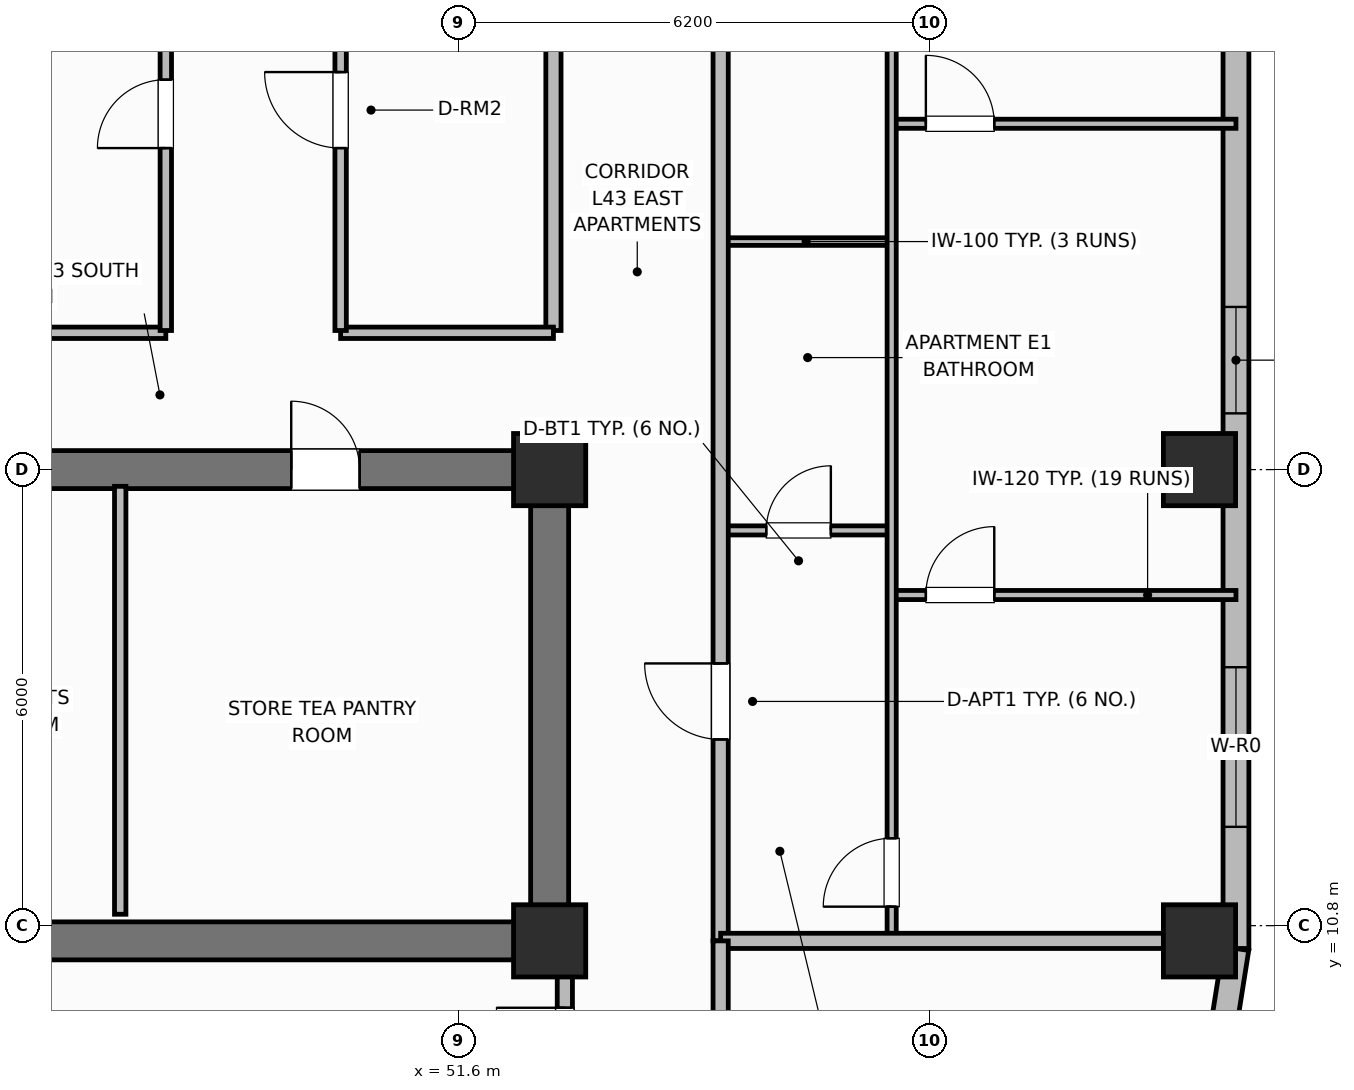
"""IFC4 building model, lengths in metres.
Left out: names, types, materials, properties, quantities, classifications, styles, units other than length and angle.
Written with IfcOpenShell. Run it as: python <this file> out.ifc"""

import sys

from ifc_helpers import new_model, si_unit, direction, frame, frame_2d, origin, origin_2d, place, context, subcontext, project, spatial, rectangle, extrude, element, fill, save


model = new_model("IFC4")
c1 = context("Model", 3, precision=1e-05, world=origin(), true_north=direction((0.0, 1.0)))
c2 = subcontext(c1, "Body", "Model", "MODEL_VIEW")
j1 = project(units=[si_unit("LENGTHUNIT", "METRE"), si_unit("PLANEANGLEUNIT", "RADIAN")], contexts=[c1])
p1 = place(None, origin())
s1 = spatial("IfcSite", under=j1, at=p1, CompositionType="ELEMENT")
p2 = place(p1, origin())
s2 = spatial("IfcBuilding", under=s1, at=p2, CompositionType="ELEMENT")
p3 = place(p2, frame((0.0, 0.0, 173.7)))
s3 = spatial("IfcBuildingStorey", under=s2, at=p3, CompositionType="ELEMENT", Elevation=173.7)
p4 = place(p3, frame((52.8, 10.6, 0.0), z_axis=(0.0, 0.0, 1.0), x_axis=(-1.0, 0.0, 0.0)))
e1 = element("IfcWall", 1, at=p4, inside=s3, PredefinedType="SHEAR", context=c2, shape_type="SweptSolid", body=[
    extrude(rectangle(XDim=27.2, YDim=0.5, at=frame_2d((13.6, 0.0))), origin(), (0.0, 0.0, 1.0), 3.7),
])
p5 = place(p3, frame((52.8, 10.85, 0.0), z_axis=(0.0, 0.0, 1.0), x_axis=(0.0, 1.0, 0.0)))
e2 = element("IfcWall", 2, at=p5, inside=s3, PredefinedType="SHEAR", context=c2, shape_type="SweptSolid", body=[
    extrude(rectangle(XDim=5.7, YDim=0.5, at=frame_2d((2.85, 0.0))), origin(), (0.0, 0.0, 1.0), 3.7),
])
p6 = place(p3, frame((25.6, 16.8, 0.0), z_axis=(0.0, 0.0, 1.0), x_axis=(1.0, 0.0, 0.0)))
e3 = element("IfcWall", 3, at=p6, inside=s3, PredefinedType="SHEAR", context=c2, shape_type="SweptSolid", body=[
    extrude(rectangle(XDim=27.2, YDim=0.5, at=frame_2d((13.6, 0.0))), origin(), (0.0, 0.0, 1.0), 3.7),
])
p7 = place(p6, frame((1.8, 0.0, 0.0)))
e4 = element("IfcOpeningElement", 4, at=p7, cuts=e3, PredefinedType="OPENING", context=c2, shape_type="SweptSolid", body=[
    extrude(rectangle(XDim=1.1, YDim=2.15, at=frame_2d((0.55, 1.075))), frame((0.0, 0.26, 0.0), z_axis=(0.0, -1.0, 0.0), x_axis=(1.0, 0.0, 0.0)), (0.0, 0.0, 1.0), 0.52),
])
p8 = place(p6, frame((5.6, 0.0, 0.0)))
e5 = element("IfcOpeningElement", 5, at=p8, cuts=e3, PredefinedType="OPENING", context=c2, shape_type="SweptSolid", body=[
    extrude(rectangle(XDim=0.85, YDim=2.1, at=frame_2d((0.425, 1.05))), frame((0.0, 0.26, 0.0), z_axis=(0.0, -1.0, 0.0), x_axis=(1.0, 0.0, 0.0)), (0.0, 0.0, 1.0), 0.52),
])
p9 = place(p6, frame((13.0, 0.0, 0.0)))
e6 = element("IfcOpeningElement", 6, at=p9, cuts=e3, PredefinedType="OPENING", context=c2, shape_type="SweptSolid", body=[
    extrude(rectangle(XDim=1.2, YDim=2.15, at=frame_2d((0.6, 1.075))), frame((0.0, 0.26, 0.0), z_axis=(0.0, -1.0, 0.0), x_axis=(1.0, 0.0, 0.0)), (0.0, 0.0, 1.0), 0.52),
])
p10 = place(p6, frame((19.2, 0.0, 0.0)))
e7 = element("IfcOpeningElement", 7, at=p10, cuts=e3, PredefinedType="OPENING", context=c2, shape_type="SweptSolid", body=[
    extrude(rectangle(XDim=0.85, YDim=2.1, at=frame_2d((0.425, 1.05))), frame((0.0, 0.26, 0.0), z_axis=(0.0, -1.0, 0.0), x_axis=(1.0, 0.0, 0.0)), (0.0, 0.0, 1.0), 0.52),
])
p11 = place(p6, frame((23.8, 0.0, 0.0)))
e8 = element("IfcOpeningElement", 8, at=p11, cuts=e3, PredefinedType="OPENING", context=c2, shape_type="SweptSolid", body=[
    extrude(rectangle(XDim=0.9, YDim=2.1, at=frame_2d((0.45, 1.05))), frame((0.0, 0.26, 0.0), z_axis=(0.0, -1.0, 0.0), x_axis=(1.0, 0.0, 0.0)), (0.0, 0.0, 1.0), 0.52),
])
for number, where, z_axis, x_axis in (
    (9, (52.8, 10.6, 0.0), (0.0, 0.0, 1.0), (1.0, 0.0, 0.0)),
    (10, (52.8, 16.8, 0.0), (0.0, 0.0, 1.0), (1.0, 0.0, 0.0)),
    (11, (61.35, 10.6, 0.0), (0.0, 0.0, 1.0), (1.0, 0.0, 0.0)),
    (12, (61.35, 16.8, 0.0), (0.0, 0.0, 1.0), (1.0, 0.0, 0.0)),
):
    element("IfcColumn", number, at=place(p3, frame(where, z_axis=z_axis, x_axis=x_axis)), inside=s3, PredefinedType="COLUMN", context=c2, shape_type="SweptSolid", body=[
        extrude(rectangle(XDim=0.95, YDim=0.95, at=origin_2d()), origin(), (0.0, 0.0, 1.0), 3.7),
    ])
p12 = place(p3, frame((61.652, 9.378, 0.0), z_axis=(0.0, 0.0, 1.0), x_axis=(0.156514556949, 0.987675651954, 0.0)))
e13 = element("IfcWall", 13, at=p12, inside=s3, PredefinedType="SOLIDWALL", context=c2, shape_type="SweptSolid", body=[
    extrude(rectangle(XDim=1.135, YDim=0.34, at=frame_2d((0.568, 0.0))), origin(), (0.0, 0.0, 1.0), 2.72),
])
p13 = place(p3, frame((61.83, 10.5, 0.0), z_axis=(0.0, 0.0, 1.0), x_axis=(0.0, 1.0, 0.0)))
e14 = element("IfcWall", 14, at=p13, inside=s3, PredefinedType="SOLIDWALL", context=c2, shape_type="SweptSolid", body=[
    extrude(rectangle(XDim=13.3, YDim=0.34, at=frame_2d((6.65, 0.0))), origin(), (0.0, 0.0, 1.0), 2.72),
])
p14 = place(p13, frame((1.6, 0.0, 0.7)))
e15 = element("IfcOpeningElement", 15, at=p14, cuts=e14, PredefinedType="OPENING", context=c2, shape_type="SweptSolid", body=[
    extrude(rectangle(XDim=2.1, YDim=1.9, at=frame_2d((1.05, 0.95))), frame((0.0, 0.18, 0.0), z_axis=(0.0, -1.0, 0.0), x_axis=(1.0, 0.0, 0.0)), (0.0, 0.0, 1.0), 0.36),
])
p15 = place(p13, frame((7.04, 0.0, 0.71)))
e16 = element("IfcOpeningElement", 16, at=p15, cuts=e14, PredefinedType="OPENING", context=c2, shape_type="SweptSolid", body=[
    extrude(rectangle(XDim=1.4, YDim=1.85, at=frame_2d((0.7, 0.925))), frame((0.0, 0.18, 0.0), z_axis=(0.0, -1.0, 0.0), x_axis=(1.0, 0.0, 0.0)), (0.0, 0.0, 1.0), 0.36),
])
p16 = place(p3, frame((47.15, 10.95, 0.0), z_axis=(0.0, 0.0, 1.0), x_axis=(0.0, 1.0, 0.0)))
e17 = element("IfcWall", 17, at=p16, inside=s3, PredefinedType="PARTITIONING", context=c2, shape_type="SweptSolid", body=[
    extrude(rectangle(XDim=5.63, YDim=0.15, at=frame_2d((2.815, 0.0))), origin(), (0.0, 0.0, 1.0), 2.55),
])
p17 = place(p3, frame((52.85, 18.63, 0.0), z_axis=(0.0, 0.0, 1.0), x_axis=(0.0, 1.0, 0.0)))
e18 = element("IfcWall", 18, at=p17, inside=s3, PredefinedType="PARTITIONING", context=c2, shape_type="SweptSolid", body=[
    extrude(rectangle(XDim=19.14, YDim=0.2, at=frame_2d((9.57, 0.0))), origin(), (0.0, 0.0, 1.0), 2.55),
])
p18 = place(p3, frame((25.55, 18.6, 0.0), z_axis=(0.0, 0.0, 1.0), x_axis=(1.0, 0.0, 0.0)))
e19 = element("IfcWall", 19, at=p18, inside=s3, PredefinedType="PARTITIONING", context=c2, shape_type="SweptSolid", body=[
    extrude(rectangle(XDim=22.2, YDim=0.15, at=frame_2d((11.1, 0.0))), origin(), (0.0, 0.0, 1.0), 2.55),
])
p19 = place(p3, frame((50.05, 18.6, 0.0), z_axis=(0.0, 0.0, 1.0), x_axis=(1.0, 0.0, 0.0)))
e20 = element("IfcWall", 20, at=p19, inside=s3, PredefinedType="PARTITIONING", context=c2, shape_type="SweptSolid", body=[
    extrude(rectangle(XDim=2.8, YDim=0.15, at=frame_2d((1.4, 0.0))), origin(), (0.0, 0.0, 1.0), 2.55),
])
p20 = place(p3, frame((47.75, 18.63, 0.0), z_axis=(0.0, 0.0, 1.0), x_axis=(0.0, 1.0, 0.0)))
e21 = element("IfcWall", 21, at=p20, inside=s3, PredefinedType="PARTITIONING", context=c2, shape_type="SweptSolid", body=[
    extrude(rectangle(XDim=19.14, YDim=0.15, at=frame_2d((9.57, 0.0))), origin(), (0.0, 0.0, 1.0), 2.55),
])
p21 = place(p20, frame((2.4, 0.0, 0.0)))
e22 = element("IfcOpeningElement", 22, at=p21, cuts=e21, PredefinedType="OPENING", context=c2, shape_type="SweptSolid", body=[
    extrude(rectangle(XDim=0.9, YDim=2.1, at=frame_2d((0.45, 1.05))), frame((0.0, 0.085, 0.0), z_axis=(0.0, -1.0, 0.0), x_axis=(1.0, 0.0, 0.0)), (0.0, 0.0, 1.0), 0.17),
])
p22 = place(p20, frame((10.804, 0.0, 0.0)))
e23 = element("IfcOpeningElement", 23, at=p22, cuts=e21, PredefinedType="OPENING", context=c2, shape_type="SweptSolid", body=[
    extrude(rectangle(XDim=0.9, YDim=2.1, at=frame_2d((0.45, 1.05))), frame((0.0, 0.085, 0.0), z_axis=(0.0, -1.0, 0.0), x_axis=(1.0, 0.0, 0.0)), (0.0, 0.0, 1.0), 0.17),
])
p23 = place(p3, frame((50.05, 18.63, 0.0), z_axis=(0.0, 0.0, 1.0), x_axis=(0.0, 1.0, 0.0)))
e24 = element("IfcWall", 24, at=p23, inside=s3, PredefinedType="PARTITIONING", context=c2, shape_type="SweptSolid", body=[
    extrude(rectangle(XDim=19.14, YDim=0.15, at=frame_2d((9.57, 0.0))), origin(), (0.0, 0.0, 1.0), 2.55),
])
p24 = place(p23, frame((2.4, 0.0, 0.0)))
e25 = element("IfcOpeningElement", 25, at=p24, cuts=e24, PredefinedType="OPENING", context=c2, shape_type="SweptSolid", body=[
    extrude(rectangle(XDim=1.0, YDim=2.15, at=frame_2d((0.5, 1.075))), frame((0.0, 0.085, 0.0), z_axis=(0.0, -1.0, 0.0), x_axis=(1.0, 0.0, 0.0)), (0.0, 0.0, 1.0), 0.17),
])
p25 = place(p23, frame((10.804, 0.0, 0.0)))
e26 = element("IfcOpeningElement", 26, at=p25, cuts=e24, PredefinedType="OPENING", context=c2, shape_type="SweptSolid", body=[
    extrude(rectangle(XDim=1.0, YDim=2.15, at=frame_2d((0.5, 1.075))), frame((0.0, 0.085, 0.0), z_axis=(0.0, -1.0, 0.0), x_axis=(1.0, 0.0, 0.0)), (0.0, 0.0, 1.0), 0.17),
])
p26 = place(p3, frame((55.05, 16.0, 0.0), z_axis=(0.0, 0.0, 1.0), x_axis=(1.0, 0.0, 0.0)))
e27 = element("IfcWall", 27, at=p26, inside=s3, PredefinedType="PARTITIONING", context=c2, shape_type="SweptSolid", body=[
    extrude(rectangle(XDim=2.25, YDim=0.12, at=frame_2d((1.125, 0.0))), origin(), (0.0, 0.0, 1.0), 2.55),
])
p27 = place(p26, frame((0.6, 0.0, 0.0)))
e28 = element("IfcOpeningElement", 28, at=p27, cuts=e27, PredefinedType="OPENING", context=c2, shape_type="SweptSolid", body=[
    extrude(rectangle(XDim=0.85, YDim=2.1, at=frame_2d((0.425, 1.05))), frame((0.0, 0.07, 0.0), z_axis=(0.0, -1.0, 0.0), x_axis=(1.0, 0.0, 0.0)), (0.0, 0.0, 1.0), 0.14),
])
p28 = place(p3, frame((55.05, 19.8, 0.0), z_axis=(0.0, 0.0, 1.0), x_axis=(1.0, 0.0, 0.0)))
e29 = element("IfcWall", 29, at=p28, inside=s3, PredefinedType="PARTITIONING", context=c2, shape_type="SweptSolid", body=[
    extrude(rectangle(XDim=2.25, YDim=0.1, at=frame_2d((1.125, 0.0))), origin(), (0.0, 0.0, 1.0), 2.55),
])
p29 = place(p3, frame((57.3, 15.15, 0.0), z_axis=(0.0, 0.0, 1.0), x_axis=(1.0, 0.0, 0.0)))
e30 = element("IfcWall", 30, at=p29, inside=s3, PredefinedType="PARTITIONING", context=c2, shape_type="SweptSolid", body=[
    extrude(rectangle(XDim=4.53, YDim=0.12, at=frame_2d((2.265, 0.0))), origin(), (0.0, 0.0, 1.0), 2.55),
])
p30 = place(p29, frame((0.45, 0.0, 0.0)))
e31 = element("IfcOpeningElement", 31, at=p30, cuts=e30, PredefinedType="OPENING", context=c2, shape_type="SweptSolid", body=[
    extrude(rectangle(XDim=0.9, YDim=2.1, at=frame_2d((0.45, 1.05))), frame((0.0, 0.07, 0.0), z_axis=(0.0, -1.0, 0.0), x_axis=(1.0, 0.0, 0.0)), (0.0, 0.0, 1.0), 0.14),
])
p31 = place(p3, frame((57.3, 21.35, 0.0), z_axis=(0.0, 0.0, 1.0), x_axis=(1.0, 0.0, 0.0)))
e32 = element("IfcWall", 32, at=p31, inside=s3, PredefinedType="PARTITIONING", context=c2, shape_type="SweptSolid", body=[
    extrude(rectangle(XDim=4.53, YDim=0.12, at=frame_2d((2.265, 0.0))), origin(), (0.0, 0.0, 1.0), 2.55),
])
p32 = place(p31, frame((0.45, 0.0, 0.0)))
e33 = element("IfcOpeningElement", 33, at=p32, cuts=e32, PredefinedType="OPENING", context=c2, shape_type="SweptSolid", body=[
    extrude(rectangle(XDim=0.9, YDim=2.1, at=frame_2d((0.45, 1.05))), frame((0.0, 0.07, 0.0), z_axis=(0.0, -1.0, 0.0), x_axis=(1.0, 0.0, 0.0)), (0.0, 0.0, 1.0), 0.14),
])
p33 = place(p3, frame((57.3, 10.64, 0.0), z_axis=(0.0, 0.0, 1.0), x_axis=(0.0, 1.0, 0.0)))
e34 = element("IfcWall", 34, at=p33, inside=s3, PredefinedType="PARTITIONING", context=c2, shape_type="SweptSolid", body=[
    extrude(rectangle(XDim=15.92, YDim=0.12, at=frame_2d((7.96, 0.0))), origin(), (0.0, 0.0, 1.0), 2.55),
])
p34 = place(p33, frame((0.41, 0.0, 0.0)))
e35 = element("IfcOpeningElement", 35, at=p34, cuts=e34, PredefinedType="OPENING", context=c2, shape_type="SweptSolid", body=[
    extrude(rectangle(XDim=0.9, YDim=2.1, at=frame_2d((0.45, 1.05))), frame((0.0, 0.07, 0.0), z_axis=(0.0, -1.0, 0.0), x_axis=(1.0, 0.0, 0.0)), (0.0, 0.0, 1.0), 0.14),
])
p35 = place(p33, frame((12.135, 0.0, 0.0)))
e36 = element("IfcOpeningElement", 36, at=p35, cuts=e34, PredefinedType="OPENING", context=c2, shape_type="SweptSolid", body=[
    extrude(rectangle(XDim=0.82, YDim=2.08, at=frame_2d((0.41, 1.04))), frame((0.0, 0.07, 0.0), z_axis=(0.0, -1.0, 0.0), x_axis=(1.0, 0.0, 0.0)), (0.0, 0.0, 1.0), 0.14),
])
p36 = place(p3, frame((55.05, 10.6, 0.0), z_axis=(0.0, 0.0, 1.0), x_axis=(0.0, 1.0, 0.0)))
e37 = element("IfcWall", 37, at=p36, inside=s3, PredefinedType="PARTITIONING", context=c2, shape_type="SweptSolid", body=[
    extrude(rectangle(XDim=35.2, YDim=0.2, at=frame_2d((17.6, 0.0))), origin(), (0.0, 0.0, 1.0), 2.55),
])
p37 = place(p36, frame((2.65, 0.0, 0.0)))
e38 = element("IfcOpeningElement", 38, at=p37, cuts=e37, PredefinedType="OPENING", context=c2, shape_type="SweptSolid", body=[
    extrude(rectangle(XDim=1.0, YDim=2.15, at=frame_2d((0.5, 1.075))), frame((0.0, 0.11, 0.0), z_axis=(0.0, -1.0, 0.0), x_axis=(1.0, 0.0, 0.0)), (0.0, 0.0, 1.0), 0.22),
])
p38 = place(p36, frame((19.95, 0.0, 0.0)))
e39 = element("IfcOpeningElement", 39, at=p38, cuts=e37, PredefinedType="OPENING", context=c2, shape_type="SweptSolid", body=[
    extrude(rectangle(XDim=1.0, YDim=2.15, at=frame_2d((0.5, 1.075))), frame((0.0, 0.11, 0.0), z_axis=(0.0, -1.0, 0.0), x_axis=(1.0, 0.0, 0.0)), (0.0, 0.0, 1.0), 0.22),
])
p39 = place(p3, frame((55.05, 10.6, 0.0), z_axis=(0.0, 0.0, 1.0), x_axis=(1.0, 0.0, 0.0)))
e40 = element("IfcWall", 40, at=p39, inside=s3, PredefinedType="PARTITIONING", context=c2, shape_type="SweptSolid", body=[
    extrude(rectangle(XDim=6.36, YDim=0.2, at=frame_2d((3.18, 0.0))), origin(), (0.0, 0.0, 1.0), 2.55),
])
p40 = place(p3, frame((55.05, 6.87, 0.0), z_axis=(0.0, 0.0, 1.0), x_axis=(0.0, 1.0, 0.0)))
e41 = element("IfcWall", 41, at=p40, inside=s3, PredefinedType="PARTITIONING", context=c2, shape_type="SweptSolid", body=[
    extrude(rectangle(XDim=3.73, YDim=0.2, at=frame_2d((1.865, 0.0))), origin(), (0.0, 0.0, 1.0), 2.55),
])
p41 = place(p3, frame((53.0, 8.17, 0.0), z_axis=(0.0, 0.0, 1.0), x_axis=(0.0, 1.0, 0.0)))
e42 = element("IfcWall", 42, at=p41, inside=s3, PredefinedType="PARTITIONING", context=c2, shape_type="SweptSolid", body=[
    extrude(rectangle(XDim=2.13, YDim=0.2, at=frame_2d((1.065, 0.0))), origin(), (0.0, 0.0, 1.0), 2.55),
])
p42 = place(p41, frame((0.65, 0.0, 0.0)))
e43 = element("IfcOpeningElement", 43, at=p42, cuts=e42, PredefinedType="OPENING", context=c2, shape_type="SweptSolid", body=[
    extrude(rectangle(XDim=0.9, YDim=2.1, at=frame_2d((0.45, 1.05))), frame((0.0, 0.11, 0.0), z_axis=(0.0, -1.0, 0.0), x_axis=(1.0, 0.0, 0.0)), (0.0, 0.0, 1.0), 0.22),
])
p43 = place(p14, origin())
e44 = element("IfcWindow", 44, at=p43, inside=s3, PartitioningType="SINGLE_PANEL", PredefinedType="WINDOW", context=c2, shape_type="SweptSolid", body=[
    extrude(rectangle(XDim=2.1, YDim=1.9, at=frame_2d((1.05, 0.95))), frame((0.0, 0.03, 0.0), z_axis=(0.0, -1.0, 0.0), x_axis=(1.0, 0.0, 0.0)), (0.0, 0.0, 1.0), 0.06),
])
fill(e15, e44)
p44 = place(p15, origin())
e45 = element("IfcWindow", 45, at=p44, inside=s3, PartitioningType="SINGLE_PANEL", PredefinedType="WINDOW", context=c2, shape_type="SweptSolid", body=[
    extrude(rectangle(XDim=1.4, YDim=1.85, at=frame_2d((0.7, 0.925))), frame((0.0, 0.03, 0.0), z_axis=(0.0, -1.0, 0.0), x_axis=(1.0, 0.0, 0.0)), (0.0, 0.0, 1.0), 0.06),
])
fill(e16, e45)
p45 = place(p21, origin())
e46 = element("IfcDoor", 46, at=p45, inside=s3, OperationType="SINGLE_SWING_LEFT", PredefinedType="DOOR", context=c2, shape_type="SweptSolid", body=[
    extrude(rectangle(XDim=0.9, YDim=2.1, at=frame_2d((0.45, 1.05))), frame((0.0, 0.025, 0.0), z_axis=(0.0, -1.0, 0.0), x_axis=(1.0, 0.0, 0.0)), (0.0, 0.0, 1.0), 0.05),
])
fill(e22, e46)
p46 = place(p24, origin())
e47 = element("IfcDoor", 47, at=p46, inside=s3, OperationType="SINGLE_SWING_RIGHT", PredefinedType="DOOR", context=c2, shape_type="SweptSolid", body=[
    extrude(rectangle(XDim=1.0, YDim=2.15, at=frame_2d((0.5, 1.075))), frame((0.0, 0.025, 0.0), z_axis=(0.0, -1.0, 0.0), x_axis=(1.0, 0.0, 0.0)), (0.0, 0.0, 1.0), 0.05),
])
fill(e25, e47)
p47 = place(p27, origin())
e48 = element("IfcDoor", 48, at=p47, inside=s3, OperationType="SINGLE_SWING_RIGHT", PredefinedType="DOOR", context=c2, shape_type="SweptSolid", body=[
    extrude(rectangle(XDim=0.85, YDim=2.1, at=frame_2d((0.425, 1.05))), frame((0.0, 0.025, 0.0), z_axis=(0.0, -1.0, 0.0), x_axis=(1.0, 0.0, 0.0)), (0.0, 0.0, 1.0), 0.05),
])
fill(e28, e48)
p48 = place(p30, origin())
e49 = element("IfcDoor", 49, at=p48, inside=s3, OperationType="SINGLE_SWING_RIGHT", PredefinedType="DOOR", context=c2, shape_type="SweptSolid", body=[
    extrude(rectangle(XDim=0.9, YDim=2.1, at=frame_2d((0.45, 1.05))), frame((0.0, 0.025, 0.0), z_axis=(0.0, -1.0, 0.0), x_axis=(1.0, 0.0, 0.0)), (0.0, 0.0, 1.0), 0.05),
])
fill(e31, e49)
p49 = place(p32, origin())
e50 = element("IfcDoor", 50, at=p49, inside=s3, OperationType="SINGLE_SWING_LEFT", PredefinedType="DOOR", context=c2, shape_type="SweptSolid", body=[
    extrude(rectangle(XDim=0.9, YDim=2.1, at=frame_2d((0.45, 1.05))), frame((0.0, 0.025, 0.0), z_axis=(0.0, -1.0, 0.0), x_axis=(1.0, 0.0, 0.0)), (0.0, 0.0, 1.0), 0.05),
])
fill(e33, e50)
p50 = place(p34, origin())
e51 = element("IfcDoor", 51, at=p50, inside=s3, OperationType="SINGLE_SWING_LEFT", PredefinedType="DOOR", context=c2, shape_type="SweptSolid", body=[
    extrude(rectangle(XDim=0.9, YDim=2.1, at=frame_2d((0.45, 1.05))), frame((0.0, 0.025, 0.0), z_axis=(0.0, -1.0, 0.0), x_axis=(1.0, 0.0, 0.0)), (0.0, 0.0, 1.0), 0.05),
])
fill(e35, e51)
p51 = place(p37, origin())
e52 = element("IfcDoor", 52, at=p51, inside=s3, OperationType="SINGLE_SWING_RIGHT", PredefinedType="DOOR", context=c2, shape_type="SweptSolid", body=[
    extrude(rectangle(XDim=1.0, YDim=2.15, at=frame_2d((0.5, 1.075))), frame((0.0, 0.025, 0.0), z_axis=(0.0, -1.0, 0.0), x_axis=(1.0, 0.0, 0.0)), (0.0, 0.0, 1.0), 0.05),
])
fill(e38, e52)
p52 = place(p42, origin())
e53 = element("IfcDoor", 53, at=p52, inside=s3, OperationType="SINGLE_SWING_RIGHT", PredefinedType="DOOR", context=c2, shape_type="SweptSolid", body=[
    extrude(rectangle(XDim=0.9, YDim=2.1, at=frame_2d((0.45, 1.05))), frame((0.0, 0.025, 0.0), z_axis=(0.0, -1.0, 0.0), x_axis=(1.0, 0.0, 0.0)), (0.0, 0.0, 1.0), 0.05),
])
fill(e43, e53)
p53 = place(p11, origin())
e54 = element("IfcDoor", 54, at=p53, inside=s3, OperationType="SINGLE_SWING_LEFT", PredefinedType="DOOR", context=c2, shape_type="SweptSolid", body=[
    extrude(rectangle(XDim=0.9, YDim=2.1, at=frame_2d((0.45, 1.05))), frame((0.0, 0.025, 0.0), z_axis=(0.0, -1.0, 0.0), x_axis=(1.0, 0.0, 0.0)), (0.0, 0.0, 1.0), 0.05),
])
fill(e8, e54)
save(model, sys.argv[1])
